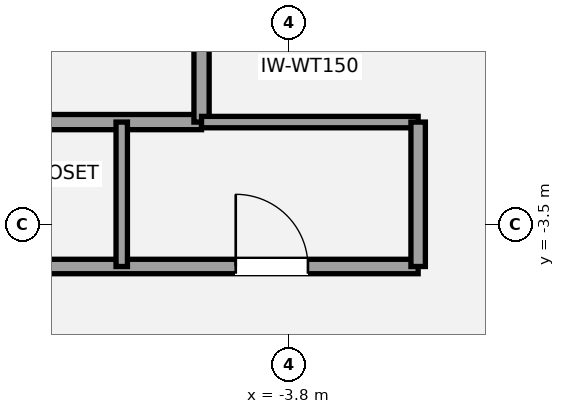
"""IFC4 building model, lengths in metres.
Left out: names, types, materials, properties, quantities, classifications, styles, units other than length and angle.
Written with IfcOpenShell. Run it as: python <this file> out.ifc"""

import sys

from ifc_helpers import new_model, si_unit, direction, frame, frame_2d, origin, place, context, subcontext, project, spatial, rectangle, extrude, element, fill, save


model = new_model("IFC4")
c1 = context("Model", 3, precision=1e-05, world=origin(), true_north=direction((0.0, 1.0)))
c2 = subcontext(c1, "Body", "Model", "MODEL_VIEW")
j1 = project(units=[si_unit("LENGTHUNIT", "METRE"), si_unit("PLANEANGLEUNIT", "RADIAN")], contexts=[c1])
p1 = place(None, origin())
s1 = spatial("IfcSite", under=j1, at=p1, CompositionType="ELEMENT")
p2 = place(p1, origin())
s2 = spatial("IfcBuilding", under=s1, at=p2, CompositionType="ELEMENT")
p3 = place(p2, frame((0.0, 0.0, 241.5)))
s3 = spatial("IfcBuildingStorey", under=s2, at=p3, CompositionType="ELEMENT", Elevation=241.5)
p4 = place(p3, frame((-7.2, -2.15, 0.0), z_axis=(0.0, 0.0, 1.0), x_axis=(1.0, 0.0, 0.0)))
e1 = element("IfcWall", 1, at=p4, inside=s3, PredefinedType="SOLIDWALL", context=c2, shape_type="SweptSolid", body=[
    extrude(rectangle(XDim=2.25, YDim=0.2, at=frame_2d((1.125, 0.0))), origin(), (0.0, 0.0, 1.0), 2.97),
])
p5 = place(p3, frame((-4.95, -2.15, 0.0), z_axis=(0.0, 0.0, 1.0), x_axis=(0.0, 1.0, 0.0)))
e2 = element("IfcWall", 2, at=p5, inside=s3, PredefinedType="SOLIDWALL", context=c2, shape_type="SweptSolid", body=[
    extrude(rectangle(XDim=3.5, YDim=0.2, at=frame_2d((1.75, 0.0))), origin(), (0.0, 0.0, 1.0), 2.423),
])
p6 = place(p5, frame((0.95, 0.0, 0.0)))
e3 = element("IfcOpeningElement", 3, at=p6, cuts=e2, PredefinedType="OPENING", context=c2, shape_type="SweptSolid", body=[
    extrude(rectangle(XDim=0.75, YDim=2.1, at=frame_2d((0.375, 1.05))), frame((0.0, 0.11, 0.0), z_axis=(0.0, -1.0, 0.0), x_axis=(1.0, 0.0, 0.0)), (0.0, 0.0, 1.0), 0.22),
])
p7 = place(p3, frame((-13.45, -4.05, 0.0), z_axis=(0.0, 0.0, 1.0), x_axis=(1.0, 0.0, 0.0)))
e4 = element("IfcWall", 4, at=p7, inside=s3, PredefinedType="PLUMBINGWALL", context=c2, shape_type="SweptSolid", body=[
    extrude(rectangle(XDim=11.35, YDim=0.19, at=frame_2d((5.675, 0.0))), origin(), (0.0, 0.0, 1.0), 2.357),
])
p8 = place(p7, frame((1.25, 0.0, 0.0)))
e5 = element("IfcOpeningElement", 5, at=p8, cuts=e4, PredefinedType="OPENING", context=c2, shape_type="SweptSolid", body=[
    extrude(rectangle(XDim=0.85, YDim=2.1, at=frame_2d((0.425, 1.05))), frame((0.0, 0.105, 0.0), z_axis=(0.0, -1.0, 0.0), x_axis=(1.0, 0.0, 0.0)), (0.0, 0.0, 1.0), 0.21),
])
p9 = place(p7, frame((5.1, 0.0, 0.0)))
e6 = element("IfcOpeningElement", 6, at=p9, cuts=e4, PredefinedType="OPENING", context=c2, shape_type="SweptSolid", body=[
    extrude(rectangle(XDim=0.85, YDim=2.1, at=frame_2d((0.425, 1.05))), frame((0.0, 0.105, 0.0), z_axis=(0.0, -1.0, 0.0), x_axis=(1.0, 0.0, 0.0)), (0.0, 0.0, 1.0), 0.21),
])
p10 = place(p7, frame((8.95, 0.0, 0.0)))
e7 = element("IfcOpeningElement", 7, at=p10, cuts=e4, PredefinedType="OPENING", context=c2, shape_type="SweptSolid", body=[
    extrude(rectangle(XDim=0.95, YDim=2.15, at=frame_2d((0.475, 1.075))), frame((0.0, 0.105, 0.0), z_axis=(0.0, -1.0, 0.0), x_axis=(1.0, 0.0, 0.0)), (0.0, 0.0, 1.0), 0.21),
])
p11 = place(p3, frame((-4.95, -2.15, 0.0), z_axis=(0.0, 0.0, 1.0), x_axis=(1.0, 0.0, 0.0)))
e8 = element("IfcWall", 8, at=p11, inside=s3, PredefinedType="PLUMBINGWALL", context=c2, shape_type="SweptSolid", body=[
    extrude(rectangle(XDim=2.85, YDim=0.15, at=frame_2d((1.425, 0.0))), origin(), (0.0, 0.0, 1.0), 2.97),
])
p12 = place(p3, frame((-2.1, -4.05, 0.0), z_axis=(0.0, 0.0, 1.0), x_axis=(0.0, 1.0, 0.0)))
e9 = element("IfcWall", 9, at=p12, inside=s3, PredefinedType="PLUMBINGWALL", context=c2, shape_type="SweptSolid", body=[
    extrude(rectangle(XDim=1.9, YDim=0.19, at=frame_2d((0.95, 0.0))), origin(), (0.0, 0.0, 1.0), 2.423),
])
p13 = place(p3, frame((-6.0, -4.05, 0.0), z_axis=(0.0, 0.0, 1.0), x_axis=(0.0, 1.0, 0.0)))
e10 = element("IfcWall", 10, at=p13, inside=s3, PredefinedType="PLUMBINGWALL", context=c2, shape_type="SweptSolid", body=[
    extrude(rectangle(XDim=1.9, YDim=0.15, at=frame_2d((0.95, 0.0))), origin(), (0.0, 0.0, 1.0), 2.431),
])
p14 = place(p10, origin())
e11 = element("IfcDoor", 11, at=p14, inside=s3, OperationType="SINGLE_SWING_LEFT", PredefinedType="DOOR", context=c2, shape_type="SweptSolid", body=[
    extrude(rectangle(XDim=0.95, YDim=2.15, at=frame_2d((0.475, 1.075))), frame((0.0, 0.025, 0.0), z_axis=(0.0, -1.0, 0.0), x_axis=(1.0, 0.0, 0.0)), (0.0, 0.0, 1.0), 0.05),
])
fill(e7, e11)
save(model, sys.argv[1])
